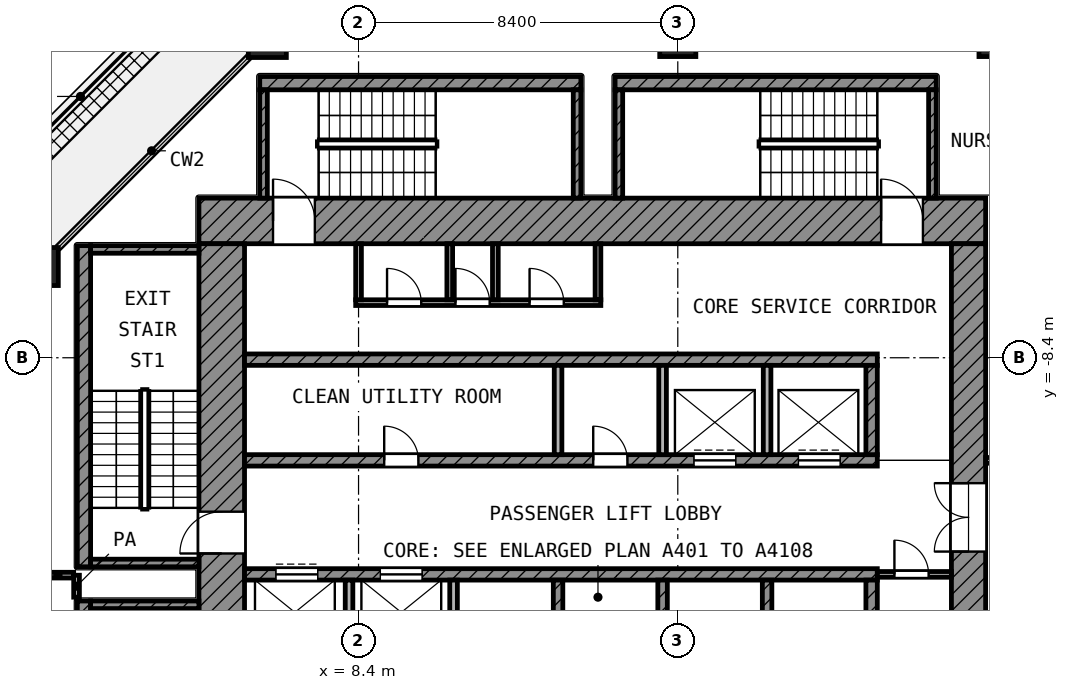
"""IFC4 building model, lengths in metres.
Left out: names, types, materials, properties, quantities, classifications, styles, units other than length and angle.
Written with IfcOpenShell. Run it as: python <this file> out.ifc"""

import sys

from ifc_helpers import new_model, si_unit, direction, frame, frame_2d, origin, origin_2d, place, context, subcontext, project, spatial, rectangle, extrude, element, fill, save


model = new_model("IFC4")
c1 = context("Model", 3, precision=1e-05, world=origin(), true_north=direction((0.0, 1.0)))
c2 = subcontext(c1, "Body", "Model", "MODEL_VIEW")
j1 = project(units=[si_unit("LENGTHUNIT", "METRE"), si_unit("PLANEANGLEUNIT", "RADIAN")], contexts=[c1])
p1 = place(None, origin())
s1 = spatial("IfcSite", under=j1, at=p1, CompositionType="ELEMENT")
p2 = place(p1, origin())
s2 = spatial("IfcBuilding", under=s1, at=p2, CompositionType="ELEMENT")
p3 = place(p2, frame((0.0, 0.0, 204.6)))
s3 = spatial("IfcBuildingStorey", under=s2, at=p3, CompositionType="ELEMENT", Elevation=204.6)
p4 = place(p3, frame((6.0, 0.0, 0.0), z_axis=(0.0, 0.0, 1.0), x_axis=(1.0, 0.0, 0.0)))
e1 = element("IfcColumn", 1, at=p4, inside=s3, PredefinedType="COLUMN", context=c2, shape_type="SweptSolid", body=[
    extrude(rectangle(XDim=1.0, YDim=1.0, at=origin_2d()), origin(), (0.0, 0.0, 1.0), 4.2),
])
for number, where, z_axis, x_axis in (
    (2, (16.8, 0.0, 0.0), (0.0, 0.0, 1.0), (1.0, 0.0, 0.0)),
    (3, (25.2, 0.0, 0.0), (0.0, 0.0, 1.0), (1.0, 0.0, 0.0)),
):
    element("IfcColumn", number, at=place(p3, frame(where, z_axis=z_axis, x_axis=x_axis)), inside=s3, PredefinedType="COLUMN", context=c2, shape_type="SweptSolid", body=[
        extrude(rectangle(XDim=0.95, YDim=0.95, at=origin_2d()), origin(), (0.0, 0.0, 1.0), 4.2),
    ])
p5 = place(p3, frame((0.0, -6.0, 0.0), z_axis=(0.0, 0.0, 1.0), x_axis=(1.0, 0.0, 0.0)))
e4 = element("IfcColumn", 4, at=p5, inside=s3, PredefinedType="COLUMN", context=c2, shape_type="SweptSolid", body=[
    extrude(rectangle(XDim=1.0, YDim=1.0, at=origin_2d()), origin(), (0.0, 0.0, 1.0), 4.2),
])
p6 = place(p3, frame((4.2, -4.8, 0.0), z_axis=(0.0, 0.0, 1.0), x_axis=(1.0, 0.0, 0.0)))
e5 = element("IfcWall", 5, at=p6, inside=s3, PredefinedType="SHEAR", context=c2, shape_type="SweptSolid", body=[
    extrude(rectangle(XDim=20.7, YDim=1.2, at=frame_2d((10.35, 0.0))), origin(), (0.0, 0.0, 1.0), 3.6),
])
p7 = place(p6, frame((1.95, 0.0, 0.0)))
e6 = element("IfcOpeningElement", 6, at=p7, cuts=e5, PredefinedType="OPENING", context=c2, shape_type="SweptSolid", body=[
    extrude(rectangle(XDim=1.1, YDim=2.1, at=frame_2d((0.55, 1.05))), frame((0.0, 0.61, 0.0), z_axis=(0.0, -1.0, 0.0), x_axis=(1.0, 0.0, 0.0)), (0.0, 0.0, 1.0), 1.22),
])
p8 = place(p6, frame((17.95, 0.0, 0.0)))
e7 = element("IfcOpeningElement", 7, at=p8, cuts=e5, PredefinedType="OPENING", context=c2, shape_type="SweptSolid", body=[
    extrude(rectangle(XDim=1.1, YDim=2.1, at=frame_2d((0.55, 1.05))), frame((0.0, 0.61, 0.0), z_axis=(0.0, -1.0, 0.0), x_axis=(1.0, 0.0, 0.0)), (0.0, 0.0, 1.0), 1.22),
])
p9 = place(p3, frame((4.8, -24.9, 0.0), z_axis=(0.0, 0.0, 1.0), x_axis=(0.0, 1.0, 0.0)))
e8 = element("IfcWall", 8, at=p9, inside=s3, PredefinedType="SHEAR", context=c2, shape_type="SweptSolid", body=[
    extrude(rectangle(XDim=19.5, YDim=1.2, at=frame_2d((9.75, 0.0))), origin(), (0.0, 0.0, 1.0), 3.6),
])
p10 = place(p9, frame((11.35, 0.0, 0.0)))
e9 = element("IfcOpeningElement", 9, at=p10, cuts=e8, PredefinedType="OPENING", context=c2, shape_type="SweptSolid", body=[
    extrude(rectangle(XDim=1.1, YDim=2.1, at=frame_2d((0.55, 1.05))), frame((0.0, 0.61, 0.0), z_axis=(0.0, -1.0, 0.0), x_axis=(1.0, 0.0, 0.0)), (0.0, 0.0, 1.0), 1.22),
])
p11 = place(p9, frame((2.05, 0.0, 0.0)))
e10 = element("IfcOpeningElement", 10, at=p11, cuts=e8, PredefinedType="OPENING", context=c2, shape_type="SweptSolid", body=[
    extrude(rectangle(XDim=1.1, YDim=2.1, at=frame_2d((0.55, 1.05))), frame((0.0, 0.61, 0.0), z_axis=(0.0, -1.0, 0.0), x_axis=(1.0, 0.0, 0.0)), (0.0, 0.0, 1.0), 1.22),
])
p12 = place(p3, frame((24.45, -24.0, 0.0), z_axis=(0.0, 0.0, 1.0), x_axis=(0.0, 1.0, 0.0)))
e11 = element("IfcWall", 11, at=p12, inside=s3, PredefinedType="SHEAR", context=c2, shape_type="SweptSolid", body=[
    extrude(rectangle(XDim=18.6, YDim=0.9, at=frame_2d((9.3, 0.0))), origin(), (0.0, 0.0, 1.0), 3.6),
])
p13 = place(p12, frame((10.5, 0.0, 0.0)))
e12 = element("IfcOpeningElement", 12, at=p13, cuts=e11, PredefinedType="OPENING", context=c2, shape_type="SweptSolid", body=[
    extrude(rectangle(XDim=1.8, YDim=2.1, at=frame_2d((0.9, 1.05))), frame((0.0, 0.46, 0.0), z_axis=(0.0, -1.0, 0.0), x_axis=(1.0, 0.0, 0.0)), (0.0, 0.0, 1.0), 0.92),
])
p14 = place(p3, frame((5.4, -8.45, 0.0), z_axis=(0.0, 0.0, 1.0), x_axis=(1.0, 0.0, 0.0)))
e13 = element("IfcWall", 13, at=p14, inside=s3, PredefinedType="SHEAR", context=c2, shape_type="SweptSolid", body=[
    extrude(rectangle(XDim=16.65, YDim=0.3, at=frame_2d((8.325, 0.0))), origin(), (0.0, 0.0, 1.0), 3.6),
])
p15 = place(p3, frame((5.4, -11.1, 0.0), z_axis=(0.0, 0.0, 1.0), x_axis=(1.0, 0.0, 0.0)))
e14 = element("IfcWall", 14, at=p15, inside=s3, PredefinedType="SHEAR", context=c2, shape_type="SweptSolid", body=[
    extrude(rectangle(XDim=16.65, YDim=0.3, at=frame_2d((8.325, 0.0))), origin(), (0.0, 0.0, 1.0), 3.6),
])
p16 = place(p15, frame((11.825, 0.0, 0.0)))
e15 = element("IfcOpeningElement", 15, at=p16, cuts=e14, PredefinedType="OPENING", context=c2, shape_type="SweptSolid", body=[
    extrude(rectangle(XDim=1.1, YDim=2.1, at=frame_2d((0.55, 1.05))), frame((0.0, 0.16, 0.0), z_axis=(0.0, -1.0, 0.0), x_axis=(1.0, 0.0, 0.0)), (0.0, 0.0, 1.0), 0.32),
])
p17 = place(p15, frame((14.575, 0.0, 0.0)))
e16 = element("IfcOpeningElement", 16, at=p17, cuts=e14, PredefinedType="OPENING", context=c2, shape_type="SweptSolid", body=[
    extrude(rectangle(XDim=1.1, YDim=2.1, at=frame_2d((0.55, 1.05))), frame((0.0, 0.16, 0.0), z_axis=(0.0, -1.0, 0.0), x_axis=(1.0, 0.0, 0.0)), (0.0, 0.0, 1.0), 0.32),
])
p18 = place(p15, frame((3.675, 0.0, 0.0)))
e17 = element("IfcOpeningElement", 17, at=p18, cuts=e14, PredefinedType="OPENING", context=c2, shape_type="SweptSolid", body=[
    extrude(rectangle(XDim=0.9, YDim=2.1, at=frame_2d((0.45, 1.05))), frame((0.0, 0.16, 0.0), z_axis=(0.0, -1.0, 0.0), x_axis=(1.0, 0.0, 0.0)), (0.0, 0.0, 1.0), 0.32),
])
p19 = place(p15, frame((9.175, 0.0, 0.0)))
e18 = element("IfcOpeningElement", 18, at=p19, cuts=e14, PredefinedType="OPENING", context=c2, shape_type="SweptSolid", body=[
    extrude(rectangle(XDim=0.9, YDim=2.1, at=frame_2d((0.45, 1.05))), frame((0.0, 0.16, 0.0), z_axis=(0.0, -1.0, 0.0), x_axis=(1.0, 0.0, 0.0)), (0.0, 0.0, 1.0), 0.32),
])
p20 = place(p3, frame((5.4, -14.1, 0.0), z_axis=(0.0, 0.0, 1.0), x_axis=(1.0, 0.0, 0.0)))
e19 = element("IfcWall", 19, at=p20, inside=s3, PredefinedType="SHEAR", context=c2, shape_type="SweptSolid", body=[
    extrude(rectangle(XDim=16.65, YDim=0.3, at=frame_2d((8.325, 0.0))), origin(), (0.0, 0.0, 1.0), 3.6),
])
p21 = place(p20, frame((0.825, 0.0, 0.0)))
e20 = element("IfcOpeningElement", 20, at=p21, cuts=e19, PredefinedType="OPENING", context=c2, shape_type="SweptSolid", body=[
    extrude(rectangle(XDim=1.1, YDim=2.1, at=frame_2d((0.55, 1.05))), frame((0.0, 0.16, 0.0), z_axis=(0.0, -1.0, 0.0), x_axis=(1.0, 0.0, 0.0)), (0.0, 0.0, 1.0), 0.32),
])
p22 = place(p20, frame((3.575, 0.0, 0.0)))
e21 = element("IfcOpeningElement", 21, at=p22, cuts=e19, PredefinedType="OPENING", context=c2, shape_type="SweptSolid", body=[
    extrude(rectangle(XDim=1.1, YDim=2.1, at=frame_2d((0.55, 1.05))), frame((0.0, 0.16, 0.0), z_axis=(0.0, -1.0, 0.0), x_axis=(1.0, 0.0, 0.0)), (0.0, 0.0, 1.0), 0.32),
])
p23 = place(p3, frame((21.9, -10.95, 0.0), z_axis=(0.0, 0.0, 1.0), x_axis=(0.0, 1.0, 0.0)))
e22 = element("IfcWall", 22, at=p23, inside=s3, PredefinedType="SHEAR", context=c2, shape_type="SweptSolid", body=[
    extrude(rectangle(XDim=2.35, YDim=0.3, at=frame_2d((1.175, 0.0))), origin(), (0.0, 0.0, 1.0), 3.6),
])
p24 = place(p3, frame((21.9, -16.6, 0.0), z_axis=(0.0, 0.0, 1.0), x_axis=(0.0, 1.0, 0.0)))
e23 = element("IfcWall", 23, at=p24, inside=s3, PredefinedType="SHEAR", context=c2, shape_type="SweptSolid", body=[
    extrude(rectangle(XDim=2.35, YDim=0.3, at=frame_2d((1.175, 0.0))), origin(), (0.0, 0.0, 1.0), 3.6),
])
for number, where, z_axis, x_axis in (
    (24, (13.65, -10.95, 0.0), (0.0, 0.0, 1.0), (0.0, 1.0, 0.0)),
    (25, (16.4, -10.95, 0.0), (0.0, 0.0, 1.0), (0.0, 1.0, 0.0)),
    (26, (19.15, -10.95, 0.0), (0.0, 0.0, 1.0), (0.0, 1.0, 0.0)),
):
    element("IfcWall", number, at=place(p3, frame(where, z_axis=z_axis, x_axis=x_axis)), inside=s3, PredefinedType="PARTITIONING", context=c2, shape_type="SweptSolid", body=[
        extrude(rectangle(XDim=2.35, YDim=0.2, at=frame_2d((1.175, 0.0))), origin(), (0.0, 0.0, 1.0), 3.6),
    ])
for number, where, z_axis, x_axis in (
    (27, (8.15, -16.6, 0.0), (0.0, 0.0, 1.0), (0.0, 1.0, 0.0)),
    (28, (10.9, -16.6, 0.0), (0.0, 0.0, 1.0), (0.0, 1.0, 0.0)),
):
    element("IfcWall", number, at=place(p3, frame(where, z_axis=z_axis, x_axis=x_axis)), inside=s3, PredefinedType="PARTITIONING", context=c2, shape_type="SweptSolid", body=[
        extrude(rectangle(XDim=2.35, YDim=0.2, at=frame_2d((1.175, 0.0))), origin(), (0.0, 0.0, 1.0), 3.6),
    ])
for number, where, z_axis, x_axis in (
    (29, (13.65, -16.6, 0.0), (0.0, 0.0, 1.0), (0.0, 1.0, 0.0)),
    (30, (16.4, -16.6, 0.0), (0.0, 0.0, 1.0), (0.0, 1.0, 0.0)),
    (31, (19.15, -16.6, 0.0), (0.0, 0.0, 1.0), (0.0, 1.0, 0.0)),
):
    element("IfcWall", number, at=place(p3, frame(where, z_axis=z_axis, x_axis=x_axis)), inside=s3, PredefinedType="SHEAR", context=c2, shape_type="SweptSolid", body=[
        extrude(rectangle(XDim=2.35, YDim=0.25, at=frame_2d((1.175, 0.0))), origin(), (0.0, 0.0, 1.0), 3.6),
    ])
p25 = place(p3, frame((22.05, -14.1, 0.0), z_axis=(0.0, 0.0, 1.0), x_axis=(1.0, 0.0, 0.0)))
e32 = element("IfcWall", 32, at=p25, inside=s3, PredefinedType="PARTITIONING", context=c2, shape_type="SweptSolid", body=[
    extrude(rectangle(XDim=1.95, YDim=0.15, at=frame_2d((0.975, 0.0))), origin(), (0.0, 0.0, 1.0), 3.6),
])
p26 = place(p25, frame((0.45, 0.0, 0.0)))
e33 = element("IfcOpeningElement", 33, at=p26, cuts=e32, PredefinedType="OPENING", context=c2, shape_type="SweptSolid", body=[
    extrude(rectangle(XDim=0.9, YDim=2.1, at=frame_2d((0.45, 1.05))), frame((0.0, 0.085, 0.0), z_axis=(0.0, -1.0, 0.0), x_axis=(1.0, 0.0, 0.0)), (0.0, 0.0, 1.0), 0.17),
])
p27 = place(p3, frame((8.325, -6.95, 0.0), z_axis=(0.0, 0.0, 1.0), x_axis=(1.0, 0.0, 0.0)))
e34 = element("IfcWall", 34, at=p27, inside=s3, PredefinedType="PARTITIONING", context=c2, shape_type="SweptSolid", body=[
    extrude(rectangle(XDim=6.45, YDim=0.15, at=frame_2d((3.225, 0.0))), origin(), (0.0, 0.0, 1.0), 3.6),
])
p28 = place(p27, frame((0.825, 0.0, 0.0)))
e35 = element("IfcOpeningElement", 35, at=p28, cuts=e34, PredefinedType="OPENING", context=c2, shape_type="SweptSolid", body=[
    extrude(rectangle(XDim=0.9, YDim=2.1, at=frame_2d((0.45, 1.05))), frame((0.0, 0.085, 0.0), z_axis=(0.0, -1.0, 0.0), x_axis=(1.0, 0.0, 0.0)), (0.0, 0.0, 1.0), 0.17),
])
p29 = place(p27, frame((2.625, 0.0, 0.0)))
e36 = element("IfcOpeningElement", 36, at=p29, cuts=e34, PredefinedType="OPENING", context=c2, shape_type="SweptSolid", body=[
    extrude(rectangle(XDim=0.9, YDim=2.1, at=frame_2d((0.45, 1.05))), frame((0.0, 0.085, 0.0), z_axis=(0.0, -1.0, 0.0), x_axis=(1.0, 0.0, 0.0)), (0.0, 0.0, 1.0), 0.17),
])
p30 = place(p27, frame((4.575, 0.0, 0.0)))
e37 = element("IfcOpeningElement", 37, at=p30, cuts=e34, PredefinedType="OPENING", context=c2, shape_type="SweptSolid", body=[
    extrude(rectangle(XDim=0.9, YDim=2.1, at=frame_2d((0.45, 1.05))), frame((0.0, 0.085, 0.0), z_axis=(0.0, -1.0, 0.0), x_axis=(1.0, 0.0, 0.0)), (0.0, 0.0, 1.0), 0.17),
])
for number, where, z_axis, x_axis in (
    (38, (8.4, -6.875, 0.0), (0.0, 0.0, 1.0), (0.0, 1.0, 0.0)),
    (39, (10.8, -6.875, 0.0), (0.0, 0.0, 1.0), (0.0, 1.0, 0.0)),
    (40, (12.0, -6.875, 0.0), (0.0, 0.0, 1.0), (0.0, 1.0, 0.0)),
    (41, (14.7, -6.875, 0.0), (0.0, 0.0, 1.0), (0.0, 1.0, 0.0)),
):
    element("IfcWall", number, at=place(p3, frame(where, z_axis=z_axis, x_axis=x_axis)), inside=s3, PredefinedType="PARTITIONING", context=c2, shape_type="SweptSolid", body=[
        extrude(rectangle(XDim=1.475, YDim=0.15, at=frame_2d((0.738, 0.0))), origin(), (0.0, 0.0, 1.0), 3.6),
    ])
p31 = place(p3, frame((1.175, -13.9, 0.0), z_axis=(0.0, 0.0, 1.0), x_axis=(0.0, 1.0, 0.0)))
e42 = element("IfcWall", 42, at=p31, inside=s3, PredefinedType="SHEAR", context=c2, shape_type="SweptSolid", body=[
    extrude(rectangle(XDim=8.45, YDim=0.35, at=frame_2d((4.225, 0.0))), origin(), (0.0, 0.0, 1.0), 3.6),
])
for number, where, z_axis, x_axis in (
    (43, (1.35, -5.55, 0.0), (0.0, 0.0, 1.0), (1.0, 0.0, 0.0)),
    (44, (1.35, -13.8, 0.0), (0.0, 0.0, 1.0), (1.0, 0.0, 0.0)),
):
    element("IfcWall", number, at=place(p3, frame(where, z_axis=z_axis, x_axis=x_axis)), inside=s3, PredefinedType="SHEAR", context=c2, shape_type="SweptSolid", body=[
        extrude(rectangle(XDim=2.85, YDim=0.2, at=frame_2d((1.425, 0.0))), origin(), (0.0, 0.0, 1.0), 3.6),
    ])
p32 = place(p3, frame((1.175, -23.25, 0.0), z_axis=(0.0, 0.0, 1.0), x_axis=(0.0, 1.0, 0.0)))
e45 = element("IfcWall", 45, at=p32, inside=s3, PredefinedType="SHEAR", context=c2, shape_type="SweptSolid", body=[
    extrude(rectangle(XDim=8.45, YDim=0.35, at=frame_2d((4.225, 0.0))), origin(), (0.0, 0.0, 1.0), 3.6),
])
p33 = place(p3, frame((1.35, -14.9, 0.0), z_axis=(0.0, 0.0, 1.0), x_axis=(1.0, 0.0, 0.0)))
e46 = element("IfcWall", 46, at=p33, inside=s3, PredefinedType="SHEAR", context=c2, shape_type="SweptSolid", body=[
    extrude(rectangle(XDim=2.85, YDim=0.2, at=frame_2d((1.425, 0.0))), origin(), (0.0, 0.0, 1.0), 3.6),
])
p34 = place(p3, frame((5.8, -1.175, 0.0), z_axis=(0.0, 0.0, 1.0), x_axis=(1.0, 0.0, 0.0)))
e47 = element("IfcWall", 47, at=p34, inside=s3, PredefinedType="SHEAR", context=c2, shape_type="SweptSolid", body=[
    extrude(rectangle(XDim=8.45, YDim=0.35, at=frame_2d((4.225, 0.0))), origin(), (0.0, 0.0, 1.0), 3.6),
])
for number, where, z_axis, x_axis in (
    (48, (5.9, -4.2, 0.0), (0.0, 0.0, 1.0), (0.0, 1.0, 0.0)),
    (49, (14.15, -4.2, 0.0), (0.0, 0.0, 1.0), (0.0, 1.0, 0.0)),
):
    element("IfcWall", number, at=place(p3, frame(where, z_axis=z_axis, x_axis=x_axis)), inside=s3, PredefinedType="SHEAR", context=c2, shape_type="SweptSolid", body=[
        extrude(rectangle(XDim=2.85, YDim=0.2, at=frame_2d((1.425, 0.0))), origin(), (0.0, 0.0, 1.0), 3.6),
    ])
p35 = place(p3, frame((15.15, -1.175, 0.0), z_axis=(0.0, 0.0, 1.0), x_axis=(1.0, 0.0, 0.0)))
e50 = element("IfcWall", 50, at=p35, inside=s3, PredefinedType="SHEAR", context=c2, shape_type="SweptSolid", body=[
    extrude(rectangle(XDim=8.45, YDim=0.35, at=frame_2d((4.225, 0.0))), origin(), (0.0, 0.0, 1.0), 3.6),
])
for number, where, z_axis, x_axis in (
    (51, (15.25, -4.2, 0.0), (0.0, 0.0, 1.0), (0.0, 1.0, 0.0)),
    (52, (23.5, -4.2, 0.0), (0.0, 0.0, 1.0), (0.0, 1.0, 0.0)),
):
    element("IfcWall", number, at=place(p3, frame(where, z_axis=z_axis, x_axis=x_axis)), inside=s3, PredefinedType="SHEAR", context=c2, shape_type="SweptSolid", body=[
        extrude(rectangle(XDim=2.85, YDim=0.2, at=frame_2d((1.425, 0.0))), origin(), (0.0, 0.0, 1.0), 3.6),
    ])
p36 = place(p3, frame((0.08, -14.12, 0.0), z_axis=(0.0, 0.0, 1.0), x_axis=(1.0, 0.0, 0.0)))
e53 = element("IfcWall", 53, at=p36, inside=s3, PredefinedType="PARTITIONING", context=c2, shape_type="SweptSolid", body=[
    extrude(rectangle(XDim=0.824, YDim=0.15, at=frame_2d((0.412, 0.0))), origin(), (0.0, 0.0, 1.0), 3.6),
])
p37 = place(p3, frame((24.9, -11.1, 0.0), z_axis=(0.0, 0.0, 1.0), x_axis=(1.0, 0.0, 0.0)))
e54 = element("IfcWall", 54, at=p37, inside=s3, PredefinedType="PARTITIONING", context=c2, shape_type="SweptSolid", body=[
    extrude(rectangle(XDim=4.424, YDim=0.15, at=frame_2d((2.212, 0.0))), origin(), (0.0, 0.0, 1.0), 3.6),
])
p38 = place(p37, frame((1.8, 0.0, 0.0)))
e55 = element("IfcOpeningElement", 55, at=p38, cuts=e54, PredefinedType="OPENING", context=c2, shape_type="SweptSolid", body=[
    extrude(rectangle(XDim=1.2, YDim=2.1, at=frame_2d((0.6, 1.05))), frame((0.0, 0.085, 0.0), z_axis=(0.0, -1.0, 0.0), x_axis=(1.0, 0.0, 0.0)), (0.0, 0.0, 1.0), 0.17),
])
p39 = place(p3, frame((0.98, -14.7, 0.0), z_axis=(0.0, 0.0, 1.0), x_axis=(0.0, 1.0, 0.0)))
e56 = element("IfcWall", 56, at=p39, inside=s3, PredefinedType="PARTITIONING", context=c2, shape_type="SweptSolid", body=[
    extrude(rectangle(XDim=0.578, YDim=0.15, at=frame_2d((0.289, 0.0))), origin(), (0.0, 0.0, 1.0), 3.6),
])
p40 = place(p16, origin())
e57 = element("IfcDoor", 57, at=p40, inside=s3, OperationType="DOUBLE_DOOR_SLIDING", PredefinedType="DOOR", context=c2, shape_type="SweptSolid", body=[
    extrude(rectangle(XDim=1.1, YDim=2.1, at=frame_2d((0.55, 1.05))), frame((0.0, 0.025, 0.0), z_axis=(0.0, -1.0, 0.0), x_axis=(1.0, 0.0, 0.0)), (0.0, 0.0, 1.0), 0.05),
])
fill(e15, e57)
p41 = place(p17, origin())
e58 = element("IfcDoor", 58, at=p41, inside=s3, OperationType="DOUBLE_DOOR_SLIDING", PredefinedType="DOOR", context=c2, shape_type="SweptSolid", body=[
    extrude(rectangle(XDim=1.1, YDim=2.1, at=frame_2d((0.55, 1.05))), frame((0.0, 0.025, 0.0), z_axis=(0.0, -1.0, 0.0), x_axis=(1.0, 0.0, 0.0)), (0.0, 0.0, 1.0), 0.05),
])
fill(e16, e58)
p42 = place(p21, origin())
e59 = element("IfcDoor", 59, at=p42, inside=s3, OperationType="DOUBLE_DOOR_SLIDING", PredefinedType="DOOR", context=c2, shape_type="SweptSolid", body=[
    extrude(rectangle(XDim=1.1, YDim=2.1, at=frame_2d((0.55, 1.05))), frame((0.0, 0.025, 0.0), z_axis=(0.0, -1.0, 0.0), x_axis=(1.0, 0.0, 0.0)), (0.0, 0.0, 1.0), 0.05),
])
fill(e20, e59)
p43 = place(p22, origin())
e60 = element("IfcDoor", 60, at=p43, inside=s3, OperationType="DOUBLE_DOOR_SLIDING", PredefinedType="DOOR", context=c2, shape_type="SweptSolid", body=[
    extrude(rectangle(XDim=1.1, YDim=2.1, at=frame_2d((0.55, 1.05))), frame((0.0, 0.025, 0.0), z_axis=(0.0, -1.0, 0.0), x_axis=(1.0, 0.0, 0.0)), (0.0, 0.0, 1.0), 0.05),
])
fill(e21, e60)
p44 = place(p10, origin())
e61 = element("IfcDoor", 61, at=p44, inside=s3, OperationType="SINGLE_SWING_LEFT", PredefinedType="DOOR", context=c2, shape_type="SweptSolid", body=[
    extrude(rectangle(XDim=1.1, YDim=2.1, at=frame_2d((0.55, 1.05))), frame((0.0, 0.025, 0.0), z_axis=(0.0, -1.0, 0.0), x_axis=(1.0, 0.0, 0.0)), (0.0, 0.0, 1.0), 0.05),
])
fill(e9, e61)
p45 = place(p7, origin())
e62 = element("IfcDoor", 62, at=p45, inside=s3, OperationType="SINGLE_SWING_LEFT", PredefinedType="DOOR", context=c2, shape_type="SweptSolid", body=[
    extrude(rectangle(XDim=1.1, YDim=2.1, at=frame_2d((0.55, 1.05))), frame((0.0, 0.025, 0.0), z_axis=(0.0, -1.0, 0.0), x_axis=(1.0, 0.0, 0.0)), (0.0, 0.0, 1.0), 0.05),
])
fill(e6, e62)
p46 = place(p8, origin())
e63 = element("IfcDoor", 63, at=p46, inside=s3, OperationType="SINGLE_SWING_LEFT", PredefinedType="DOOR", context=c2, shape_type="SweptSolid", body=[
    extrude(rectangle(XDim=1.1, YDim=2.1, at=frame_2d((0.55, 1.05))), frame((0.0, 0.025, 0.0), z_axis=(0.0, -1.0, 0.0), x_axis=(1.0, 0.0, 0.0)), (0.0, 0.0, 1.0), 0.05),
])
fill(e7, e63)
p47 = place(p13, origin())
e64 = element("IfcDoor", 64, at=p47, inside=s3, OperationType="DOUBLE_DOOR_SINGLE_SWING", PredefinedType="DOOR", context=c2, shape_type="SweptSolid", body=[
    extrude(rectangle(XDim=1.8, YDim=2.1, at=frame_2d((0.9, 1.05))), frame((0.0, 0.025, 0.0), z_axis=(0.0, -1.0, 0.0), x_axis=(1.0, 0.0, 0.0)), (0.0, 0.0, 1.0), 0.05),
])
fill(e12, e64)
p48 = place(p28, origin())
e65 = element("IfcDoor", 65, at=p48, inside=s3, OperationType="SINGLE_SWING_LEFT", PredefinedType="DOOR", context=c2, shape_type="SweptSolid", body=[
    extrude(rectangle(XDim=0.9, YDim=2.1, at=frame_2d((0.45, 1.05))), frame((0.0, 0.025, 0.0), z_axis=(0.0, -1.0, 0.0), x_axis=(1.0, 0.0, 0.0)), (0.0, 0.0, 1.0), 0.05),
])
fill(e35, e65)
p49 = place(p29, origin())
e66 = element("IfcDoor", 66, at=p49, inside=s3, OperationType="SINGLE_SWING_LEFT", PredefinedType="DOOR", context=c2, shape_type="SweptSolid", body=[
    extrude(rectangle(XDim=0.9, YDim=2.1, at=frame_2d((0.45, 1.05))), frame((0.0, 0.025, 0.0), z_axis=(0.0, -1.0, 0.0), x_axis=(1.0, 0.0, 0.0)), (0.0, 0.0, 1.0), 0.05),
])
fill(e36, e66)
p50 = place(p30, origin())
e67 = element("IfcDoor", 67, at=p50, inside=s3, OperationType="SINGLE_SWING_LEFT", PredefinedType="DOOR", context=c2, shape_type="SweptSolid", body=[
    extrude(rectangle(XDim=0.9, YDim=2.1, at=frame_2d((0.45, 1.05))), frame((0.0, 0.025, 0.0), z_axis=(0.0, -1.0, 0.0), x_axis=(1.0, 0.0, 0.0)), (0.0, 0.0, 1.0), 0.05),
])
fill(e37, e67)
p51 = place(p26, origin())
e68 = element("IfcDoor", 68, at=p51, inside=s3, OperationType="SINGLE_SWING_LEFT", PredefinedType="DOOR", context=c2, shape_type="SweptSolid", body=[
    extrude(rectangle(XDim=0.9, YDim=2.1, at=frame_2d((0.45, 1.05))), frame((0.0, 0.025, 0.0), z_axis=(0.0, -1.0, 0.0), x_axis=(1.0, 0.0, 0.0)), (0.0, 0.0, 1.0), 0.05),
])
fill(e33, e68)
p52 = place(p18, origin())
e69 = element("IfcDoor", 69, at=p52, inside=s3, OperationType="SINGLE_SWING_LEFT", PredefinedType="DOOR", context=c2, shape_type="SweptSolid", body=[
    extrude(rectangle(XDim=0.9, YDim=2.1, at=frame_2d((0.45, 1.05))), frame((0.0, 0.025, 0.0), z_axis=(0.0, -1.0, 0.0), x_axis=(1.0, 0.0, 0.0)), (0.0, 0.0, 1.0), 0.05),
])
fill(e17, e69)
p53 = place(p19, origin())
e70 = element("IfcDoor", 70, at=p53, inside=s3, OperationType="SINGLE_SWING_LEFT", PredefinedType="DOOR", context=c2, shape_type="SweptSolid", body=[
    extrude(rectangle(XDim=0.9, YDim=2.1, at=frame_2d((0.45, 1.05))), frame((0.0, 0.025, 0.0), z_axis=(0.0, -1.0, 0.0), x_axis=(1.0, 0.0, 0.0)), (0.0, 0.0, 1.0), 0.05),
])
fill(e18, e70)
save(model, sys.argv[1])
